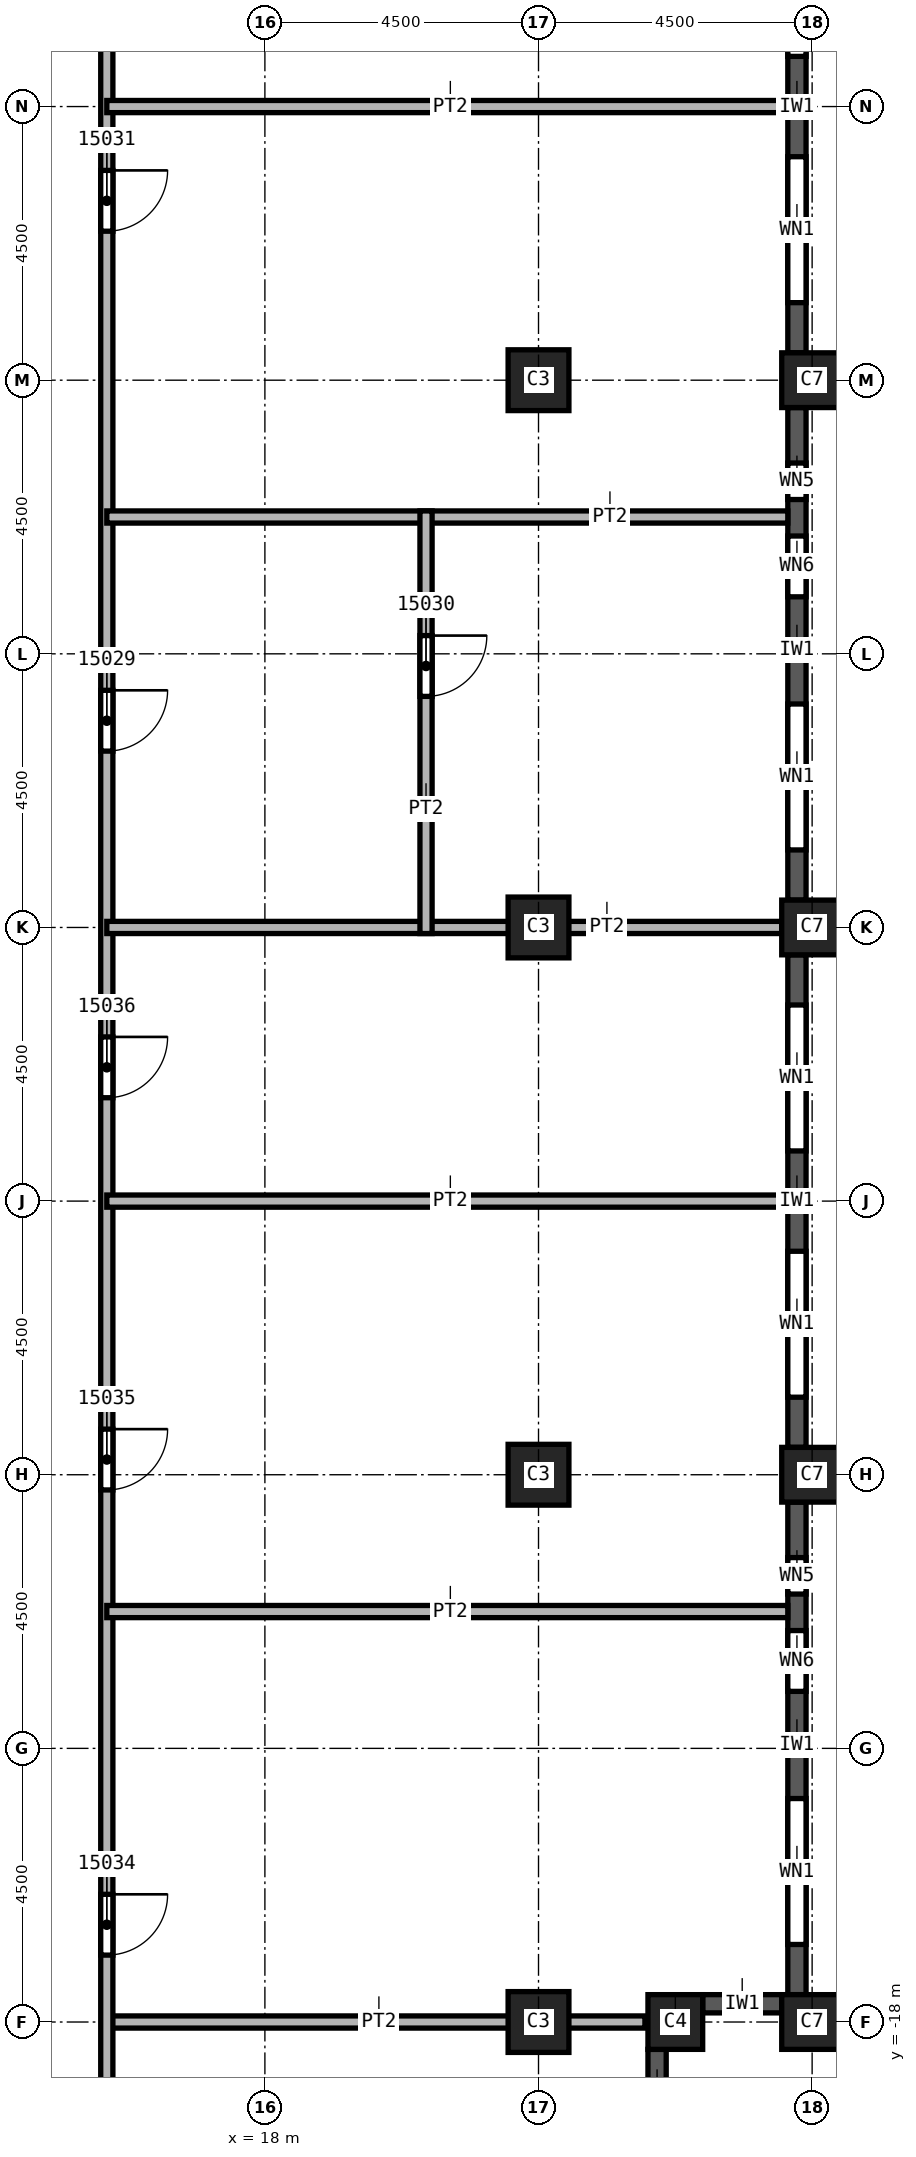
"""IFC4 building model, lengths in metres.
Left out: names, types, materials, properties, quantities, classifications, styles, units other than length and angle.
Written with IfcOpenShell. Run it as: python <this file> out.ifc"""

import sys

from ifc_helpers import new_model, si_unit, direction, frame, frame_2d, origin, origin_2d, place, context, subcontext, project, spatial, rectangle, extrude, element, fill, save


model = new_model("IFC4")
c1 = context("Model", 3, precision=1e-05, world=origin(), true_north=direction((0.0, 1.0)))
c2 = subcontext(c1, "Body", "Model", "MODEL_VIEW")
j1 = project(units=[si_unit("LENGTHUNIT", "METRE"), si_unit("PLANEANGLEUNIT", "RADIAN")], contexts=[c1])
p1 = place(None, origin())
s1 = spatial("IfcSite", under=j1, at=p1, CompositionType="ELEMENT")
p2 = place(p1, origin())
s2 = spatial("IfcBuilding", under=s1, at=p2, CompositionType="ELEMENT")
p3 = place(p2, frame((0.0, 0.0, 232.0)))
s3 = spatial("IfcBuildingStorey", under=s2, at=p3, CompositionType="ELEMENT", Elevation=232.0)
for number, where, z_axis, x_axis in (
    (1, (22.5, 0.0, 0.0), (0.0, 0.0, 1.0), (1.0, 0.0, 0.0)),
    (2, (22.5, 9.0, 0.0), (0.0, 0.0, 1.0), (1.0, 0.0, 0.0)),
    (3, (22.5, -9.0, 0.0), (0.0, 0.0, 1.0), (1.0, 0.0, 0.0)),
    (4, (22.5, -18.0, 0.0), (0.0, 0.0, 1.0), (1.0, 0.0, 0.0)),
):
    element("IfcColumn", number, at=place(p3, frame(where, z_axis=z_axis, x_axis=x_axis)), inside=s3, PredefinedType="COLUMN", context=c2, shape_type="SweptSolid", body=[
        extrude(rectangle(XDim=1.0, YDim=1.0, at=origin_2d()), origin(), (0.0, 0.0, 1.0), 3.6),
    ])
for number, where, z_axis, x_axis in (
    (5, (27.0, 0.0, 0.0), (0.0, 0.0, 1.0), (0.0, 1.0, 0.0)),
    (6, (27.0, 9.0, 0.0), (0.0, 0.0, 1.0), (0.0, 1.0, 0.0)),
    (7, (27.0, -9.0, 0.0), (0.0, 0.0, 1.0), (0.0, 1.0, 0.0)),
    (8, (27.0, -18.0, 0.0), (0.0, 0.0, 1.0), (0.0, 1.0, 0.0)),
):
    element("IfcColumn", number, at=place(p3, frame(where, z_axis=z_axis, x_axis=x_axis)), inside=s3, PredefinedType="COLUMN", context=c2, shape_type="SweptSolid", body=[
        extrude(rectangle(XDim=0.9, YDim=1.0, at=origin_2d()), origin(), (0.0, 0.0, 1.0), 3.6),
    ])
p4 = place(p3, frame((24.75, -18.0, 0.0), z_axis=(0.0, 0.0, 1.0), x_axis=(1.0, 0.0, 0.0)))
e9 = element("IfcColumn", 9, at=p4, inside=s3, PredefinedType="COLUMN", context=c2, shape_type="SweptSolid", body=[
    extrude(rectangle(XDim=0.9, YDim=0.9, at=origin_2d()), origin(), (0.0, 0.0, 1.0), 3.6),
])
p5 = place(p3, frame((24.45, -19.95, 0.0), z_axis=(0.0, 0.0, 1.0), x_axis=(0.0, 1.0, 0.0)))
e10 = element("IfcWall", 10, at=p5, inside=s3, PredefinedType="SOLIDWALL", context=c2, shape_type="SweptSolid", body=[
    extrude(rectangle(XDim=1.5, YDim=0.3, at=frame_2d((0.75, 0.0))), origin(), (0.0, 0.0, 1.0), 3.0),
])
p6 = place(p3, frame((25.2, -17.7, 0.0), z_axis=(0.0, 0.0, 1.0), x_axis=(1.0, 0.0, 0.0)))
e11 = element("IfcWall", 11, at=p6, inside=s3, PredefinedType="SOLIDWALL", context=c2, shape_type="SweptSolid", body=[
    extrude(rectangle(XDim=1.3, YDim=0.3, at=frame_2d((0.65, 0.0))), origin(), (0.0, 0.0, 1.0), 3.0),
])
p7 = place(p3, frame((26.75, -17.55, 0.0), z_axis=(0.0, 0.0, 1.0), x_axis=(0.0, 1.0, 0.0)))
e12 = element("IfcWall", 12, at=p7, inside=s3, PredefinedType="SOLIDWALL", context=c2, shape_type="SweptSolid", body=[
    extrude(rectangle(XDim=8.1, YDim=0.3, at=frame_2d((4.05, 0.0))), origin(), (0.0, 0.0, 1.0), 3.0),
])
p8 = place(p7, frame((0.825, 0.0, 0.8)))
e13 = element("IfcOpeningElement", 13, at=p8, cuts=e12, PredefinedType="OPENING", context=c2, shape_type="SweptSolid", body=[
    extrude(rectangle(XDim=2.4, YDim=1.95, at=frame_2d((1.2, 0.975))), frame((0.0, 0.15, 0.0), z_axis=(0.0, -1.0, 0.0), x_axis=(1.0, 0.0, 0.0)), (0.0, 0.0, 1.0), 0.3),
])
p9 = place(p7, frame((4.988, 0.0, 0.8)))
e14 = element("IfcOpeningElement", 14, at=p9, cuts=e12, PredefinedType="OPENING", context=c2, shape_type="SweptSolid", body=[
    extrude(rectangle(XDim=1.0, YDim=1.95, at=frame_2d((0.5, 0.975))), frame((0.0, 0.15, 0.0), z_axis=(0.0, -1.0, 0.0), x_axis=(1.0, 0.0, 0.0)), (0.0, 0.0, 1.0), 0.3),
])
p10 = place(p7, frame((6.587, 0.0, 0.8)))
e15 = element("IfcOpeningElement", 15, at=p10, cuts=e12, PredefinedType="OPENING", context=c2, shape_type="SweptSolid", body=[
    extrude(rectangle(XDim=0.6, YDim=1.95, at=frame_2d((0.3, 0.975))), frame((0.0, 0.15, 0.0), z_axis=(0.0, -1.0, 0.0), x_axis=(1.0, 0.0, 0.0)), (0.0, 0.0, 1.0), 0.3),
])
p11 = place(p3, frame((26.75, -8.55, 0.0), z_axis=(0.0, 0.0, 1.0), x_axis=(0.0, 1.0, 0.0)))
e16 = element("IfcWall", 16, at=p11, inside=s3, PredefinedType="SOLIDWALL", context=c2, shape_type="SweptSolid", body=[
    extrude(rectangle(XDim=8.1, YDim=0.3, at=frame_2d((4.05, 0.0))), origin(), (0.0, 0.0, 1.0), 3.0),
])
p12 = place(p11, frame((0.825, 0.0, 0.8)))
e17 = element("IfcOpeningElement", 17, at=p12, cuts=e16, PredefinedType="OPENING", context=c2, shape_type="SweptSolid", body=[
    extrude(rectangle(XDim=2.4, YDim=1.95, at=frame_2d((1.2, 0.975))), frame((0.0, 0.15, 0.0), z_axis=(0.0, -1.0, 0.0), x_axis=(1.0, 0.0, 0.0)), (0.0, 0.0, 1.0), 0.3),
])
p13 = place(p11, frame((4.875, 0.0, 0.8)))
e18 = element("IfcOpeningElement", 18, at=p13, cuts=e16, PredefinedType="OPENING", context=c2, shape_type="SweptSolid", body=[
    extrude(rectangle(XDim=2.4, YDim=1.95, at=frame_2d((1.2, 0.975))), frame((0.0, 0.15, 0.0), z_axis=(0.0, -1.0, 0.0), x_axis=(1.0, 0.0, 0.0)), (0.0, 0.0, 1.0), 0.3),
])
p14 = place(p3, frame((26.75, 0.45, 0.0), z_axis=(0.0, 0.0, 1.0), x_axis=(0.0, 1.0, 0.0)))
e19 = element("IfcWall", 19, at=p14, inside=s3, PredefinedType="SOLIDWALL", context=c2, shape_type="SweptSolid", body=[
    extrude(rectangle(XDim=8.1, YDim=0.3, at=frame_2d((4.05, 0.0))), origin(), (0.0, 0.0, 1.0), 3.0),
])
p15 = place(p14, frame((0.825, 0.0, 0.8)))
e20 = element("IfcOpeningElement", 20, at=p15, cuts=e19, PredefinedType="OPENING", context=c2, shape_type="SweptSolid", body=[
    extrude(rectangle(XDim=2.4, YDim=1.95, at=frame_2d((1.2, 0.975))), frame((0.0, 0.15, 0.0), z_axis=(0.0, -1.0, 0.0), x_axis=(1.0, 0.0, 0.0)), (0.0, 0.0, 1.0), 0.3),
])
p16 = place(p14, frame((4.988, 0.0, 0.8)))
e21 = element("IfcOpeningElement", 21, at=p16, cuts=e19, PredefinedType="OPENING", context=c2, shape_type="SweptSolid", body=[
    extrude(rectangle(XDim=1.0, YDim=1.95, at=frame_2d((0.5, 0.975))), frame((0.0, 0.15, 0.0), z_axis=(0.0, -1.0, 0.0), x_axis=(1.0, 0.0, 0.0)), (0.0, 0.0, 1.0), 0.3),
])
p17 = place(p14, frame((6.587, 0.0, 0.8)))
e22 = element("IfcOpeningElement", 22, at=p17, cuts=e19, PredefinedType="OPENING", context=c2, shape_type="SweptSolid", body=[
    extrude(rectangle(XDim=0.6, YDim=1.95, at=frame_2d((0.3, 0.975))), frame((0.0, 0.15, 0.0), z_axis=(0.0, -1.0, 0.0), x_axis=(1.0, 0.0, 0.0)), (0.0, 0.0, 1.0), 0.3),
])
p18 = place(p3, frame((26.75, 9.45, 0.0), z_axis=(0.0, 0.0, 1.0), x_axis=(0.0, 1.0, 0.0)))
e23 = element("IfcWall", 23, at=p18, inside=s3, PredefinedType="SOLIDWALL", context=c2, shape_type="SweptSolid", body=[
    extrude(rectangle(XDim=8.1, YDim=0.3, at=frame_2d((4.05, 0.0))), origin(), (0.0, 0.0, 1.0), 3.0),
])
p19 = place(p18, frame((0.825, 0.0, 0.8)))
e24 = element("IfcOpeningElement", 24, at=p19, cuts=e23, PredefinedType="OPENING", context=c2, shape_type="SweptSolid", body=[
    extrude(rectangle(XDim=2.4, YDim=1.95, at=frame_2d((1.2, 0.975))), frame((0.0, 0.15, 0.0), z_axis=(0.0, -1.0, 0.0), x_axis=(1.0, 0.0, 0.0)), (0.0, 0.0, 1.0), 0.3),
])
p20 = place(p18, frame((4.875, 0.0, 0.8)))
e25 = element("IfcOpeningElement", 25, at=p20, cuts=e23, PredefinedType="OPENING", context=c2, shape_type="SweptSolid", body=[
    extrude(rectangle(XDim=2.4, YDim=1.95, at=frame_2d((1.2, 0.975))), frame((0.0, 0.15, 0.0), z_axis=(0.0, -1.0, 0.0), x_axis=(1.0, 0.0, 0.0)), (0.0, 0.0, 1.0), 0.3),
])
p21 = place(p3, frame((15.4, -18.0, 0.0), z_axis=(0.0, 0.0, 1.0), x_axis=(1.0, 0.0, 0.0)))
e26 = element("IfcWall", 26, at=p21, inside=s3, PredefinedType="PARTITIONING", context=c2, shape_type="SweptSolid", body=[
    extrude(rectangle(XDim=8.85, YDim=0.2, at=frame_2d((4.425, 0.0))), origin(), (0.0, 0.0, 1.0), 3.6),
])
p22 = place(p3, frame((15.4, 22.4, 0.0), z_axis=(0.0, 0.0, 1.0), x_axis=(0.0, -1.0, 0.0)))
e27 = element("IfcWall", 27, at=p22, inside=s3, PredefinedType="PARTITIONING", context=c2, shape_type="SweptSolid", body=[
    extrude(rectangle(XDim=44.8, YDim=0.2, at=frame_2d((22.4, 0.0))), origin(), (0.0, 0.0, 1.0), 3.6),
])
p23 = place(p22, frame((18.5, 0.0, 0.0)))
e28 = element("IfcOpeningElement", 28, at=p23, cuts=e27, PredefinedType="OPENING", context=c2, shape_type="SweptSolid", body=[
    extrude(rectangle(XDim=1.0, YDim=2.1, at=frame_2d((0.5, 1.05))), frame((0.0, 0.1, 0.0), z_axis=(0.0, -1.0, 0.0), x_axis=(1.0, 0.0, 0.0)), (0.0, 0.0, 1.0), 0.2),
])
p24 = place(p22, frame((9.95, 0.0, 0.0)))
e29 = element("IfcOpeningElement", 29, at=p24, cuts=e27, PredefinedType="OPENING", context=c2, shape_type="SweptSolid", body=[
    extrude(rectangle(XDim=1.0, YDim=2.1, at=frame_2d((0.5, 1.05))), frame((0.0, 0.1, 0.0), z_axis=(0.0, -1.0, 0.0), x_axis=(1.0, 0.0, 0.0)), (0.0, 0.0, 1.0), 0.2),
])
p25 = place(p22, frame((1.3, 0.0, 0.0)))
e30 = element("IfcOpeningElement", 30, at=p25, cuts=e27, PredefinedType="OPENING", context=c2, shape_type="SweptSolid", body=[
    extrude(rectangle(XDim=1.0, YDim=2.1, at=frame_2d((0.5, 1.05))), frame((0.0, 0.1, 0.0), z_axis=(0.0, -1.0, 0.0), x_axis=(1.0, 0.0, 0.0)), (0.0, 0.0, 1.0), 0.2),
])
p26 = place(p22, frame((43.55, 0.0, 0.0)))
e31 = element("IfcOpeningElement", 31, at=p26, cuts=e27, PredefinedType="OPENING", context=c2, shape_type="SweptSolid", body=[
    extrude(rectangle(XDim=1.0, YDim=2.1, at=frame_2d((0.5, 1.05))), frame((0.0, 0.1, 0.0), z_axis=(0.0, -1.0, 0.0), x_axis=(1.0, 0.0, 0.0)), (0.0, 0.0, 1.0), 0.2),
])
p27 = place(p22, frame((38.3, 0.0, 0.0)))
e32 = element("IfcOpeningElement", 32, at=p27, cuts=e27, PredefinedType="OPENING", context=c2, shape_type="SweptSolid", body=[
    extrude(rectangle(XDim=1.0, YDim=2.1, at=frame_2d((0.5, 1.05))), frame((0.0, 0.1, 0.0), z_axis=(0.0, -1.0, 0.0), x_axis=(1.0, 0.0, 0.0)), (0.0, 0.0, 1.0), 0.2),
])
p28 = place(p22, frame((30.65, 0.0, 0.0)))
e33 = element("IfcOpeningElement", 33, at=p28, cuts=e27, PredefinedType="OPENING", context=c2, shape_type="SweptSolid", body=[
    extrude(rectangle(XDim=1.0, YDim=2.1, at=frame_2d((0.5, 1.05))), frame((0.0, 0.1, 0.0), z_axis=(0.0, -1.0, 0.0), x_axis=(1.0, 0.0, 0.0)), (0.0, 0.0, 1.0), 0.2),
])
p29 = place(p22, frame((24.2, 0.0, 0.0)))
e34 = element("IfcOpeningElement", 34, at=p29, cuts=e27, PredefinedType="OPENING", context=c2, shape_type="SweptSolid", body=[
    extrude(rectangle(XDim=1.0, YDim=2.1, at=frame_2d((0.5, 1.05))), frame((0.0, 0.1, 0.0), z_axis=(0.0, -1.0, 0.0), x_axis=(1.0, 0.0, 0.0)), (0.0, 0.0, 1.0), 0.2),
])
for number, where, z_axis, x_axis in (
    (35, (15.4, -11.25, 0.0), (0.0, 0.0, 1.0), (1.0, 0.0, 0.0)),
    (36, (15.4, -4.5, 0.0), (0.0, 0.0, 1.0), (1.0, 0.0, 0.0)),
    (37, (15.4, 6.75, 0.0), (0.0, 0.0, 1.0), (1.0, 0.0, 0.0)),
    (38, (15.4, 13.5, 0.0), (0.0, 0.0, 1.0), (1.0, 0.0, 0.0)),
):
    element("IfcWall", number, at=place(p3, frame(where, z_axis=z_axis, x_axis=x_axis)), inside=s3, PredefinedType="PARTITIONING", context=c2, shape_type="SweptSolid", body=[
        extrude(rectangle(XDim=11.2, YDim=0.2, at=frame_2d((5.6, 0.0))), origin(), (0.0, 0.0, 1.0), 3.6),
    ])
p30 = place(p3, frame((26.5, 0.0, 0.0), z_axis=(0.0, 0.0, 1.0), x_axis=(-1.0, 0.0, 0.0)))
e39 = element("IfcWall", 39, at=p30, inside=s3, PredefinedType="PARTITIONING", context=c2, shape_type="SweptSolid", body=[
    extrude(rectangle(XDim=11.1, YDim=0.2, at=frame_2d((5.55, 0.0))), origin(), (0.0, 0.0, 1.0), 3.6),
])
p31 = place(p3, frame((20.65, 6.85, 0.0), z_axis=(0.0, 0.0, 1.0), x_axis=(0.0, -1.0, 0.0)))
e40 = element("IfcWall", 40, at=p31, inside=s3, PredefinedType="PARTITIONING", context=c2, shape_type="SweptSolid", body=[
    extrude(rectangle(XDim=6.95, YDim=0.2, at=frame_2d((3.475, 0.0))), origin(), (0.0, 0.0, 1.0), 3.6),
])
p32 = place(p31, frame((2.05, 0.0, 0.0)))
e41 = element("IfcOpeningElement", 41, at=p32, cuts=e40, PredefinedType="OPENING", context=c2, shape_type="SweptSolid", body=[
    extrude(rectangle(XDim=1.0, YDim=2.1, at=frame_2d((0.5, 1.05))), frame((0.0, 0.1, 0.0), z_axis=(0.0, -1.0, 0.0), x_axis=(1.0, 0.0, 0.0)), (0.0, 0.0, 1.0), 0.2),
])
p33 = place(p8, origin())
e42 = element("IfcWindow", 42, at=p33, inside=s3, PartitioningType="SINGLE_PANEL", PredefinedType="WINDOW", context=c2, shape_type="SweptSolid", body=[
    extrude(rectangle(XDim=2.4, YDim=1.95, at=frame_2d((1.2, 0.975))), frame((0.0, 0.03, 0.0), z_axis=(0.0, -1.0, 0.0), x_axis=(1.0, 0.0, 0.0)), (0.0, 0.0, 1.0), 0.06),
])
fill(e13, e42)
p34 = place(p12, origin())
e43 = element("IfcWindow", 43, at=p34, inside=s3, PartitioningType="SINGLE_PANEL", PredefinedType="WINDOW", context=c2, shape_type="SweptSolid", body=[
    extrude(rectangle(XDim=2.4, YDim=1.95, at=frame_2d((1.2, 0.975))), frame((0.0, 0.03, 0.0), z_axis=(0.0, -1.0, 0.0), x_axis=(1.0, 0.0, 0.0)), (0.0, 0.0, 1.0), 0.06),
])
fill(e17, e43)
p35 = place(p13, origin())
e44 = element("IfcWindow", 44, at=p35, inside=s3, PartitioningType="SINGLE_PANEL", PredefinedType="WINDOW", context=c2, shape_type="SweptSolid", body=[
    extrude(rectangle(XDim=2.4, YDim=1.95, at=frame_2d((1.2, 0.975))), frame((0.0, 0.03, 0.0), z_axis=(0.0, -1.0, 0.0), x_axis=(1.0, 0.0, 0.0)), (0.0, 0.0, 1.0), 0.06),
])
fill(e18, e44)
p36 = place(p15, origin())
e45 = element("IfcWindow", 45, at=p36, inside=s3, PartitioningType="SINGLE_PANEL", PredefinedType="WINDOW", context=c2, shape_type="SweptSolid", body=[
    extrude(rectangle(XDim=2.4, YDim=1.95, at=frame_2d((1.2, 0.975))), frame((0.0, 0.03, 0.0), z_axis=(0.0, -1.0, 0.0), x_axis=(1.0, 0.0, 0.0)), (0.0, 0.0, 1.0), 0.06),
])
fill(e20, e45)
p37 = place(p19, origin())
e46 = element("IfcWindow", 46, at=p37, inside=s3, PartitioningType="SINGLE_PANEL", PredefinedType="WINDOW", context=c2, shape_type="SweptSolid", body=[
    extrude(rectangle(XDim=2.4, YDim=1.95, at=frame_2d((1.2, 0.975))), frame((0.0, 0.03, 0.0), z_axis=(0.0, -1.0, 0.0), x_axis=(1.0, 0.0, 0.0)), (0.0, 0.0, 1.0), 0.06),
])
fill(e24, e46)
p38 = place(p20, origin())
e47 = element("IfcWindow", 47, at=p38, inside=s3, PartitioningType="SINGLE_PANEL", PredefinedType="WINDOW", context=c2, shape_type="SweptSolid", body=[
    extrude(rectangle(XDim=2.4, YDim=1.95, at=frame_2d((1.2, 0.975))), frame((0.0, 0.03, 0.0), z_axis=(0.0, -1.0, 0.0), x_axis=(1.0, 0.0, 0.0)), (0.0, 0.0, 1.0), 0.06),
])
fill(e25, e47)
p39 = place(p23, origin())
e48 = element("IfcDoor", 48, at=p39, inside=s3, OperationType="SINGLE_SWING_RIGHT", PredefinedType="DOOR", context=c2, shape_type="SweptSolid", body=[
    extrude(rectangle(XDim=1.0, YDim=2.1, at=frame_2d((0.5, 1.05))), frame((0.0, 0.025, 0.0), z_axis=(0.0, -1.0, 0.0), x_axis=(1.0, 0.0, 0.0)), (0.0, 0.0, 1.0), 0.05),
])
fill(e28, e48)
p40 = place(p32, origin())
e49 = element("IfcDoor", 49, at=p40, inside=s3, OperationType="SINGLE_SWING_LEFT", PredefinedType="DOOR", context=c2, shape_type="SweptSolid", body=[
    extrude(rectangle(XDim=1.0, YDim=2.1, at=frame_2d((0.5, 1.05))), frame((0.0, 0.025, 0.0), z_axis=(0.0, -1.0, 0.0), x_axis=(1.0, 0.0, 0.0)), (0.0, 0.0, 1.0), 0.05),
])
fill(e41, e49)
p41 = place(p24, origin())
e50 = element("IfcDoor", 50, at=p41, inside=s3, OperationType="SINGLE_SWING_RIGHT", PredefinedType="DOOR", context=c2, shape_type="SweptSolid", body=[
    extrude(rectangle(XDim=1.0, YDim=2.1, at=frame_2d((0.5, 1.05))), frame((0.0, 0.025, 0.0), z_axis=(0.0, -1.0, 0.0), x_axis=(1.0, 0.0, 0.0)), (0.0, 0.0, 1.0), 0.05),
])
fill(e29, e50)
p42 = place(p27, origin())
e51 = element("IfcDoor", 51, at=p42, inside=s3, OperationType="SINGLE_SWING_LEFT", PredefinedType="DOOR", context=c2, shape_type="SweptSolid", body=[
    extrude(rectangle(XDim=1.0, YDim=2.1, at=frame_2d((0.5, 1.05))), frame((0.0, 0.025, 0.0), z_axis=(0.0, -1.0, 0.0), x_axis=(1.0, 0.0, 0.0)), (0.0, 0.0, 1.0), 0.05),
])
fill(e32, e51)
p43 = place(p28, origin())
e52 = element("IfcDoor", 52, at=p43, inside=s3, OperationType="SINGLE_SWING_RIGHT", PredefinedType="DOOR", context=c2, shape_type="SweptSolid", body=[
    extrude(rectangle(XDim=1.0, YDim=2.1, at=frame_2d((0.5, 1.05))), frame((0.0, 0.025, 0.0), z_axis=(0.0, -1.0, 0.0), x_axis=(1.0, 0.0, 0.0)), (0.0, 0.0, 1.0), 0.05),
])
fill(e33, e52)
p44 = place(p29, origin())
e53 = element("IfcDoor", 53, at=p44, inside=s3, OperationType="SINGLE_SWING_LEFT", PredefinedType="DOOR", context=c2, shape_type="SweptSolid", body=[
    extrude(rectangle(XDim=1.0, YDim=2.1, at=frame_2d((0.5, 1.05))), frame((0.0, 0.025, 0.0), z_axis=(0.0, -1.0, 0.0), x_axis=(1.0, 0.0, 0.0)), (0.0, 0.0, 1.0), 0.05),
])
fill(e34, e53)
p45 = place(p9, origin())
e54 = element("IfcWindow", 54, at=p45, inside=s3, PartitioningType="SINGLE_PANEL", PredefinedType="WINDOW", context=c2, shape_type="SweptSolid", body=[
    extrude(rectangle(XDim=1.0, YDim=1.95, at=frame_2d((0.5, 0.975))), frame((0.0, 0.03, 0.0), z_axis=(0.0, -1.0, 0.0), x_axis=(1.0, 0.0, 0.0)), (0.0, 0.0, 1.0), 0.06),
])
fill(e14, e54)
p46 = place(p10, origin())
e55 = element("IfcWindow", 55, at=p46, inside=s3, PartitioningType="SINGLE_PANEL", PredefinedType="WINDOW", context=c2, shape_type="SweptSolid", body=[
    extrude(rectangle(XDim=0.6, YDim=1.95, at=frame_2d((0.3, 0.975))), frame((0.0, 0.03, 0.0), z_axis=(0.0, -1.0, 0.0), x_axis=(1.0, 0.0, 0.0)), (0.0, 0.0, 1.0), 0.06),
])
fill(e15, e55)
p47 = place(p16, origin())
e56 = element("IfcWindow", 56, at=p47, inside=s3, PartitioningType="SINGLE_PANEL", PredefinedType="WINDOW", context=c2, shape_type="SweptSolid", body=[
    extrude(rectangle(XDim=1.0, YDim=1.95, at=frame_2d((0.5, 0.975))), frame((0.0, 0.03, 0.0), z_axis=(0.0, -1.0, 0.0), x_axis=(1.0, 0.0, 0.0)), (0.0, 0.0, 1.0), 0.06),
])
fill(e21, e56)
p48 = place(p17, origin())
e57 = element("IfcWindow", 57, at=p48, inside=s3, PartitioningType="SINGLE_PANEL", PredefinedType="WINDOW", context=c2, shape_type="SweptSolid", body=[
    extrude(rectangle(XDim=0.6, YDim=1.95, at=frame_2d((0.3, 0.975))), frame((0.0, 0.03, 0.0), z_axis=(0.0, -1.0, 0.0), x_axis=(1.0, 0.0, 0.0)), (0.0, 0.0, 1.0), 0.06),
])
fill(e22, e57)
save(model, sys.argv[1])
